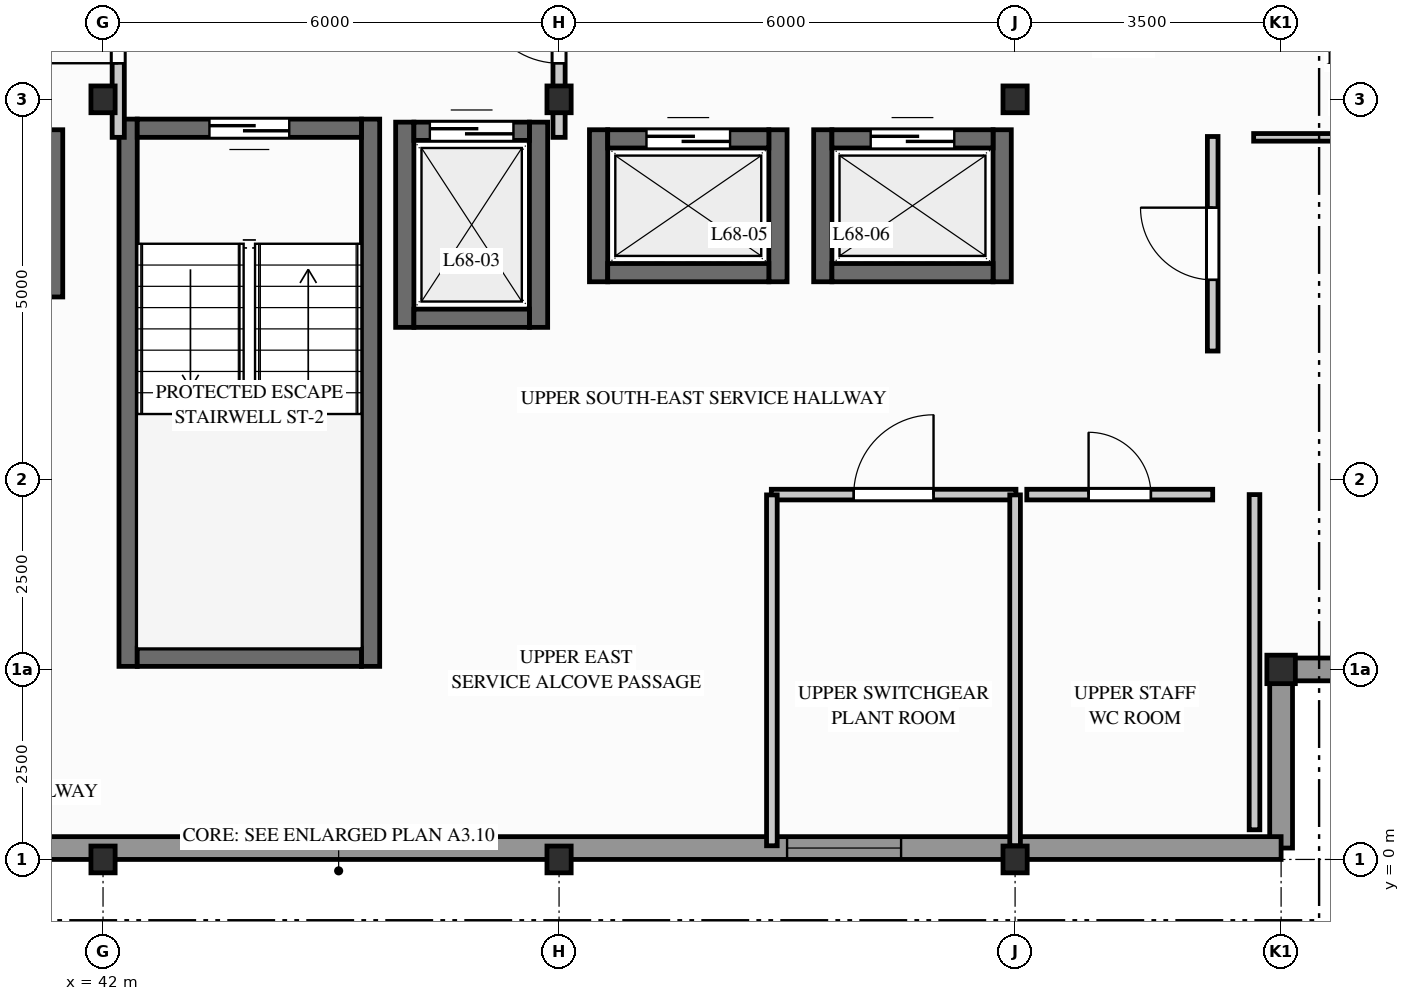
"""IFC4 building model, lengths in metres.
Left out: names, types, materials, properties, quantities, classifications, styles, units other than length and angle.
Written with IfcOpenShell. Run it as: python <this file> out.ifc"""

import sys

from ifc_helpers import new_model, si_unit, direction, frame, frame_2d, origin, origin_2d, place, context, subcontext, project, spatial, rectangle, i_section, extrude, element, fill, save


model = new_model("IFC4")
c1 = context("Model", 3, precision=1e-05, world=origin(), true_north=direction((0.0, 1.0)))
c2 = subcontext(c1, "Body", "Model", "MODEL_VIEW")
j1 = project(units=[si_unit("LENGTHUNIT", "METRE"), si_unit("PLANEANGLEUNIT", "RADIAN")], contexts=[c1])
p1 = place(None, origin())
s1 = spatial("IfcSite", under=j1, at=p1, CompositionType="ELEMENT")
p2 = place(p1, origin())
s2 = spatial("IfcBuilding", under=s1, at=p2, CompositionType="ELEMENT")
p3 = place(p2, frame((0.0, 0.0, 224.2)))
s3 = spatial("IfcBuildingStorey", under=s2, at=p3, CompositionType="ELEMENT", Elevation=224.2)
for number, where, z_axis, x_axis in (
    (1, (42.0, 0.0, 0.0), (0.0, 0.0, 1.0), (1.0, 0.0, 0.0)),
    (2, (42.0, 10.0, 0.0), (0.0, 0.0, 1.0), (1.0, 0.0, 0.0)),
    (3, (48.0, 0.0, 0.0), (0.0, 0.0, 1.0), (1.0, 0.0, 0.0)),
    (4, (48.0, 10.0, 0.0), (0.0, 0.0, 1.0), (1.0, 0.0, 0.0)),
    (5, (54.0, 0.0, 0.0), (0.0, 0.0, 1.0), (1.0, 0.0, 0.0)),
    (6, (54.0, 10.0, 0.0), (0.0, 0.0, 1.0), (1.0, 0.0, 0.0)),
):
    element("IfcColumn", number, at=place(p3, frame(where, z_axis=z_axis, x_axis=x_axis)), inside=s3, PredefinedType="COLUMN", context=c2, shape_type="SweptSolid", body=[
        extrude(i_section(OverallWidth=0.318, OverallDepth=0.353, WebThickness=0.023, FlangeThickness=0.038, FilletRadius=0.015, at=origin_2d()), origin(), (0.0, 0.0, 1.0), 3.1),
    ])
p4 = place(p3, frame((57.5, 2.5, 0.0), z_axis=(0.0, 0.0, 1.0), x_axis=(1.0, 0.0, 0.0)))
e7 = element("IfcColumn", 7, at=p4, inside=s3, PredefinedType="COLUMN", context=c2, shape_type="SweptSolid", body=[
    extrude(i_section(OverallWidth=0.375, OverallDepth=0.375, WebThickness=0.017, FlangeThickness=0.027, FilletRadius=0.015, at=origin_2d()), origin(), (0.0, 0.0, 1.0), 3.1),
])
for number, where, z_axis, x_axis in (
    (8, (57.5, 0.15, 0.0), (0.0, 0.0, 1.0), (0.0, 1.0, 0.0)),
    (9, (57.5, 2.5, 0.0), (0.0, 0.0, 1.0), (1.0, 0.0, 0.0)),
):
    element("IfcWall", number, at=place(p3, frame(where, z_axis=z_axis, x_axis=x_axis)), inside=s3, PredefinedType="STANDARD", context=c2, shape_type="SweptSolid", body=[
        extrude(rectangle(XDim=2.35, YDim=0.3, at=frame_2d((1.175, 0.0))), origin(), (0.0, 0.0, 1.0), 2.89),
    ])
p5 = place(p3, frame((29.75, 0.15, 0.0), z_axis=(0.0, 0.0, 1.0), x_axis=(1.0, 0.0, 0.0)))
e10 = element("IfcWall", 10, at=p5, inside=s3, PredefinedType="STANDARD", context=c2, shape_type="SweptSolid", body=[
    extrude(rectangle(XDim=27.75, YDim=0.3, at=frame_2d((13.875, 0.0))), origin(), (0.0, 0.0, 1.0), 2.332),
])
p6 = place(p5, frame((2.5, 0.0, 0.712)))
e11 = element("IfcOpeningElement", 11, at=p6, cuts=e10, PredefinedType="OPENING", context=c2, shape_type="SweptSolid", body=[
    extrude(rectangle(XDim=0.8, YDim=1.4, at=frame_2d((0.4, 0.7))), frame((0.0, 0.16, 0.0), z_axis=(0.0, -1.0, 0.0), x_axis=(1.0, 0.0, 0.0)), (0.0, 0.0, 1.0), 0.32),
])
p7 = place(p5, frame((21.25, 0.0, 0.312)))
e12 = element("IfcOpeningElement", 12, at=p7, cuts=e10, PredefinedType="OPENING", context=c2, shape_type="SweptSolid", body=[
    extrude(rectangle(XDim=1.5, YDim=1.8, at=frame_2d((0.75, 0.9))), frame((0.0, 0.16, 0.0), z_axis=(0.0, -1.0, 0.0), x_axis=(1.0, 0.0, 0.0)), (0.0, 0.0, 1.0), 0.32),
])
for number, where, z_axis, x_axis in (
    (13, (42.33, 2.54, 0.0), (0.0, 0.0, 1.0), (0.0, 1.0, 0.0)),
    (14, (45.52, 2.54, 0.0), (0.0, 0.0, 1.0), (0.0, 1.0, 0.0)),
):
    element("IfcWall", number, at=place(p3, frame(where, z_axis=z_axis, x_axis=x_axis)), inside=s3, PredefinedType="SHEAR", context=c2, shape_type="SweptSolid", body=[
        extrude(rectangle(XDim=7.2, YDim=0.24, at=frame_2d((3.6, 0.0))), origin(), (0.0, 0.0, 1.0), 2.89),
    ])
p8 = place(p3, frame((42.45, 2.66, 0.0), z_axis=(0.0, 0.0, 1.0), x_axis=(1.0, 0.0, 0.0)))
e15 = element("IfcWall", 15, at=p8, inside=s3, PredefinedType="SHEAR", context=c2, shape_type="SweptSolid", body=[
    extrude(rectangle(XDim=2.95, YDim=0.24, at=frame_2d((1.475, 0.0))), origin(), (0.0, 0.0, 1.0), 2.89),
])
p9 = place(p3, frame((45.4, 9.62, 0.0), z_axis=(0.0, 0.0, 1.0), x_axis=(-1.0, 0.0, 0.0)))
e16 = element("IfcWall", 16, at=p9, inside=s3, PredefinedType="SHEAR", context=c2, shape_type="SweptSolid", body=[
    extrude(rectangle(XDim=2.95, YDim=0.24, at=frame_2d((1.475, 0.0))), origin(), (0.0, 0.0, 1.0), 2.89),
])
p10 = place(p9, frame((0.95, 0.0, 0.0)))
e17 = element("IfcOpeningElement", 17, at=p10, cuts=e16, PredefinedType="OPENING", context=c2, shape_type="SweptSolid", body=[
    extrude(rectangle(XDim=1.05, YDim=2.06, at=frame_2d((0.525, 1.03))), frame((0.0, 0.13, 0.0), z_axis=(0.0, -1.0, 0.0), x_axis=(1.0, 0.0, 0.0)), (0.0, 0.0, 1.0), 0.26),
])
for number, where, z_axis, x_axis in (
    (18, (45.97, 7.0, 0.0), (0.0, 0.0, 1.0), (0.0, 1.0, 0.0)),
    (19, (47.73, 7.0, 0.0), (0.0, 0.0, 1.0), (0.0, 1.0, 0.0)),
):
    element("IfcWall", number, at=place(p3, frame(where, z_axis=z_axis, x_axis=x_axis)), inside=s3, PredefinedType="SHEAR", context=c2, shape_type="SweptSolid", body=[
        extrude(rectangle(XDim=2.7, YDim=0.24, at=frame_2d((1.35, 0.0))), origin(), (0.0, 0.0, 1.0), 2.89),
    ])
p11 = place(p3, frame((46.09, 7.12, 0.0), z_axis=(0.0, 0.0, 1.0), x_axis=(1.0, 0.0, 0.0)))
e20 = element("IfcWall", 20, at=p11, inside=s3, PredefinedType="SHEAR", context=c2, shape_type="SweptSolid", body=[
    extrude(rectangle(XDim=1.52, YDim=0.24, at=frame_2d((0.76, 0.0))), origin(), (0.0, 0.0, 1.0), 2.89),
])
p12 = place(p3, frame((46.09, 9.58, 0.0), z_axis=(0.0, 0.0, 1.0), x_axis=(1.0, 0.0, 0.0)))
e21 = element("IfcWall", 21, at=p12, inside=s3, PredefinedType="SHEAR", context=c2, shape_type="SweptSolid", body=[
    extrude(rectangle(XDim=1.52, YDim=0.24, at=frame_2d((0.76, 0.0))), origin(), (0.0, 0.0, 1.0), 2.89),
])
p13 = place(p12, frame((0.21, 0.0, 0.0)))
e22 = element("IfcOpeningElement", 22, at=p13, cuts=e21, PredefinedType="OPENING", context=c2, shape_type="SweptSolid", body=[
    extrude(rectangle(XDim=1.1, YDim=2.06, at=frame_2d((0.55, 1.03))), frame((0.0, 0.13, 0.0), z_axis=(0.0, -1.0, 0.0), x_axis=(1.0, 0.0, 0.0)), (0.0, 0.0, 1.0), 0.26),
])
p14 = place(p3, frame((41.35, 7.4, 0.0), z_axis=(0.0, 0.0, 1.0), x_axis=(0.0, 1.0, 0.0)))
e23 = element("IfcWall", 23, at=p14, inside=s3, PredefinedType="SHEAR", context=c2, shape_type="SweptSolid", body=[
    extrude(rectangle(XDim=2.2, YDim=0.24, at=frame_2d((1.1, 0.0))), origin(), (0.0, 0.0, 1.0), 2.89),
])
for number, where, z_axis, x_axis in (
    (24, (48.52, 7.6, 0.0), (0.0, 0.0, 1.0), (0.0, 1.0, 0.0)),
    (25, (50.88, 7.6, 0.0), (0.0, 0.0, 1.0), (0.0, 1.0, 0.0)),
):
    element("IfcWall", number, at=place(p3, frame(where, z_axis=z_axis, x_axis=x_axis)), inside=s3, PredefinedType="SHEAR", context=c2, shape_type="SweptSolid", body=[
        extrude(rectangle(XDim=2.0, YDim=0.24, at=frame_2d((1.0, 0.0))), origin(), (0.0, 0.0, 1.0), 2.89),
    ])
p15 = place(p3, frame((48.64, 7.72, 0.0), z_axis=(0.0, 0.0, 1.0), x_axis=(1.0, 0.0, 0.0)))
e26 = element("IfcWall", 26, at=p15, inside=s3, PredefinedType="SHEAR", context=c2, shape_type="SweptSolid", body=[
    extrude(rectangle(XDim=2.12, YDim=0.24, at=frame_2d((1.06, 0.0))), origin(), (0.0, 0.0, 1.0), 2.89),
])
p16 = place(p3, frame((48.64, 9.48, 0.0), z_axis=(0.0, 0.0, 1.0), x_axis=(1.0, 0.0, 0.0)))
e27 = element("IfcWall", 27, at=p16, inside=s3, PredefinedType="SHEAR", context=c2, shape_type="SweptSolid", body=[
    extrude(rectangle(XDim=2.12, YDim=0.24, at=frame_2d((1.06, 0.0))), origin(), (0.0, 0.0, 1.0), 2.89),
])
p17 = place(p16, frame((0.51, 0.0, 0.0)))
e28 = element("IfcOpeningElement", 28, at=p17, cuts=e27, PredefinedType="OPENING", context=c2, shape_type="SweptSolid", body=[
    extrude(rectangle(XDim=1.1, YDim=2.06, at=frame_2d((0.55, 1.03))), frame((0.0, 0.13, 0.0), z_axis=(0.0, -1.0, 0.0), x_axis=(1.0, 0.0, 0.0)), (0.0, 0.0, 1.0), 0.26),
])
for number, where, z_axis, x_axis in (
    (29, (51.47, 7.6, 0.0), (0.0, 0.0, 1.0), (0.0, 1.0, 0.0)),
    (30, (53.83, 7.6, 0.0), (0.0, 0.0, 1.0), (0.0, 1.0, 0.0)),
):
    element("IfcWall", number, at=place(p3, frame(where, z_axis=z_axis, x_axis=x_axis)), inside=s3, PredefinedType="SHEAR", context=c2, shape_type="SweptSolid", body=[
        extrude(rectangle(XDim=2.0, YDim=0.24, at=frame_2d((1.0, 0.0))), origin(), (0.0, 0.0, 1.0), 2.89),
    ])
p18 = place(p3, frame((51.59, 7.72, 0.0), z_axis=(0.0, 0.0, 1.0), x_axis=(1.0, 0.0, 0.0)))
e31 = element("IfcWall", 31, at=p18, inside=s3, PredefinedType="SHEAR", context=c2, shape_type="SweptSolid", body=[
    extrude(rectangle(XDim=2.12, YDim=0.24, at=frame_2d((1.06, 0.0))), origin(), (0.0, 0.0, 1.0), 2.89),
])
p19 = place(p3, frame((51.59, 9.48, 0.0), z_axis=(0.0, 0.0, 1.0), x_axis=(1.0, 0.0, 0.0)))
e32 = element("IfcWall", 32, at=p19, inside=s3, PredefinedType="SHEAR", context=c2, shape_type="SweptSolid", body=[
    extrude(rectangle(XDim=2.12, YDim=0.24, at=frame_2d((1.06, 0.0))), origin(), (0.0, 0.0, 1.0), 2.89),
])
p20 = place(p19, frame((0.51, 0.0, 0.0)))
e33 = element("IfcOpeningElement", 33, at=p20, cuts=e32, PredefinedType="OPENING", context=c2, shape_type="SweptSolid", body=[
    extrude(rectangle(XDim=1.1, YDim=2.06, at=frame_2d((0.55, 1.03))), frame((0.0, 0.13, 0.0), z_axis=(0.0, -1.0, 0.0), x_axis=(1.0, 0.0, 0.0)), (0.0, 0.0, 1.0), 0.26),
])
p21 = place(p3, frame((50.793, 4.8, 0.0), z_axis=(0.0, 0.0, 1.0), x_axis=(1.0, 0.0, 0.0)))
e34 = element("IfcWall", 34, at=p21, inside=s3, PredefinedType="PARTITIONING", context=c2, shape_type="SweptSolid", body=[
    extrude(rectangle(XDim=3.219, YDim=0.14, at=frame_2d((1.609, 0.0))), origin(), (0.0, 0.0, 1.0), 2.325),
])
p22 = place(p21, frame((1.084, 0.0, 0.0)))
e35 = element("IfcOpeningElement", 35, at=p22, cuts=e34, PredefinedType="OPENING", context=c2, shape_type="SweptSolid", body=[
    extrude(rectangle(XDim=1.05, YDim=2.06, at=frame_2d((0.525, 1.03))), frame((0.0, 0.08, 0.0), z_axis=(0.0, -1.0, 0.0), x_axis=(1.0, 0.0, 0.0)), (0.0, 0.0, 1.0), 0.16),
])
p23 = place(p3, frame((54.154, 4.8, 0.0), z_axis=(0.0, 0.0, 1.0), x_axis=(1.0, 0.0, 0.0)))
e36 = element("IfcWall", 36, at=p23, inside=s3, PredefinedType="PARTITIONING", context=c2, shape_type="SweptSolid", body=[
    extrude(rectangle(XDim=2.446, YDim=0.14, at=frame_2d((1.223, 0.0))), origin(), (0.0, 0.0, 1.0), 2.89),
])
p24 = place(p23, frame((0.813, 0.0, 0.0)))
e37 = element("IfcOpeningElement", 37, at=p24, cuts=e36, PredefinedType="OPENING", context=c2, shape_type="SweptSolid", body=[
    extrude(rectangle(XDim=0.82, YDim=2.02, at=frame_2d((0.41, 1.01))), frame((0.0, 0.08, 0.0), z_axis=(0.0, -1.0, 0.0), x_axis=(1.0, 0.0, 0.0)), (0.0, 0.0, 1.0), 0.16),
])
p25 = place(p3, frame((56.6, 6.689, 0.0), z_axis=(0.0, 0.0, 1.0), x_axis=(0.0, 1.0, 0.0)))
e38 = element("IfcWall", 38, at=p25, inside=s3, PredefinedType="PARTITIONING", context=c2, shape_type="SweptSolid", body=[
    extrude(rectangle(XDim=2.823, YDim=0.14, at=frame_2d((1.411, 0.0))), origin(), (0.0, 0.0, 1.0), 2.89),
])
p26 = place(p25, frame((0.936, 0.0, 0.0)))
e39 = element("IfcOpeningElement", 39, at=p26, cuts=e38, PredefinedType="OPENING", context=c2, shape_type="SweptSolid", body=[
    extrude(rectangle(XDim=0.95, YDim=2.05, at=frame_2d((0.475, 1.025))), frame((0.0, 0.08, 0.0), z_axis=(0.0, -1.0, 0.0), x_axis=(1.0, 0.0, 0.0)), (0.0, 0.0, 1.0), 0.16),
])
p27 = place(p3, frame((50.8, 0.18, 0.0), z_axis=(0.0, 0.0, 1.0), x_axis=(0.0, 1.0, 0.0)))
e40 = element("IfcWall", 40, at=p27, inside=s3, PredefinedType="PARTITIONING", context=c2, shape_type="SweptSolid", body=[
    extrude(rectangle(XDim=4.616, YDim=0.14, at=frame_2d((2.308, 0.0))), origin(), (0.0, 0.0, 1.0), 2.89),
])
p28 = place(p3, frame((54.0, 0.18, 0.0), z_axis=(0.0, 0.0, 1.0), x_axis=(0.0, 1.0, 0.0)))
e41 = element("IfcWall", 41, at=p28, inside=s3, PredefinedType="PARTITIONING", context=c2, shape_type="SweptSolid", body=[
    extrude(rectangle(XDim=4.616, YDim=0.14, at=frame_2d((2.308, 0.0))), origin(), (0.0, 0.0, 1.0), 2.325),
])
p29 = place(p3, frame((42.2, 9.5, 0.0), z_axis=(0.0, 0.0, 1.0), x_axis=(0.0, 1.0, 0.0)))
e42 = element("IfcWall", 42, at=p29, inside=s3, PredefinedType="PARTITIONING", context=c2, shape_type="SweptSolid", body=[
    extrude(rectangle(XDim=3.0, YDim=0.16, at=frame_2d((1.5, 0.0))), origin(), (0.0, 0.0, 1.0), 2.325),
])
p30 = place(p29, frame((0.975, 0.0, 0.0)))
e43 = element("IfcOpeningElement", 43, at=p30, cuts=e42, PredefinedType="OPENING", context=c2, shape_type="SweptSolid", body=[
    extrude(rectangle(XDim=1.05, YDim=2.06, at=frame_2d((0.525, 1.03))), frame((0.0, 0.09, 0.0), z_axis=(0.0, -1.0, 0.0), x_axis=(1.0, 0.0, 0.0)), (0.0, 0.0, 1.0), 0.18),
])
p31 = place(p3, frame((48.0, 9.5, 0.0), z_axis=(0.0, 0.0, 1.0), x_axis=(0.0, 1.0, 0.0)))
e44 = element("IfcWall", 44, at=p31, inside=s3, PredefinedType="PARTITIONING", context=c2, shape_type="SweptSolid", body=[
    extrude(rectangle(XDim=3.0, YDim=0.16, at=frame_2d((1.5, 0.0))), origin(), (0.0, 0.0, 1.0), 2.325),
])
p32 = place(p31, frame((0.975, 0.0, 0.0)))
e45 = element("IfcOpeningElement", 45, at=p32, cuts=e44, PredefinedType="OPENING", context=c2, shape_type="SweptSolid", body=[
    extrude(rectangle(XDim=1.05, YDim=2.06, at=frame_2d((0.525, 1.03))), frame((0.0, 0.09, 0.0), z_axis=(0.0, -1.0, 0.0), x_axis=(1.0, 0.0, 0.0)), (0.0, 0.0, 1.0), 0.18),
])
p33 = place(p3, frame((57.139, 9.5, 0.0), z_axis=(0.0, 0.0, 1.0), x_axis=(1.0, 0.0, 0.0)))
e46 = element("IfcWall", 46, at=p33, inside=s3, PredefinedType="PARTITIONING", context=c2, shape_type="SweptSolid", body=[
    extrude(rectangle(XDim=2.661, YDim=0.1, at=frame_2d((1.331, 0.0))), origin(), (0.0, 0.0, 1.0), 2.89),
])
p34 = place(p3, frame((57.15, 0.39, 0.0), z_axis=(0.0, 0.0, 1.0), x_axis=(0.0, 1.0, 0.0)))
e47 = element("IfcWall", 47, at=p34, inside=s3, PredefinedType="PARTITIONING", context=c2, shape_type="SweptSolid", body=[
    extrude(rectangle(XDim=4.41, YDim=0.14, at=frame_2d((2.205, 0.0))), origin(), (0.0, 0.0, 1.0), 2.89),
])
p35 = place(p7, origin())
e48 = element("IfcWindow", 48, at=p35, inside=s3, PartitioningType="SINGLE_PANEL", PredefinedType="WINDOW", context=c2, shape_type="SweptSolid", body=[
    extrude(rectangle(XDim=1.5, YDim=1.8, at=frame_2d((0.75, 0.9))), frame((0.0, 0.03, 0.0), z_axis=(0.0, -1.0, 0.0), x_axis=(1.0, 0.0, 0.0)), (0.0, 0.0, 1.0), 0.06),
])
fill(e12, e48)
p36 = place(p10, origin())
e49 = element("IfcDoor", 49, at=p36, inside=s3, OperationType="SINGLE_SWING_LEFT", PredefinedType="DOOR", context=c2, shape_type="SweptSolid", body=[
    extrude(rectangle(XDim=1.05, YDim=2.06, at=frame_2d((0.525, 1.03))), frame((0.0, 0.025, 0.0), z_axis=(0.0, -1.0, 0.0), x_axis=(1.0, 0.0, 0.0)), (0.0, 0.0, 1.0), 0.05),
])
fill(e17, e49)
p37 = place(p13, origin())
e50 = element("IfcDoor", 50, at=p37, inside=s3, OperationType="SLIDING_TO_LEFT", PredefinedType="DOOR", context=c2, shape_type="SweptSolid", body=[
    extrude(rectangle(XDim=1.1, YDim=2.06, at=frame_2d((0.55, 1.03))), frame((0.0, 0.025, 0.0), z_axis=(0.0, -1.0, 0.0), x_axis=(1.0, 0.0, 0.0)), (0.0, 0.0, 1.0), 0.05),
])
fill(e22, e50)
p38 = place(p17, origin())
e51 = element("IfcDoor", 51, at=p38, inside=s3, OperationType="SLIDING_TO_LEFT", PredefinedType="DOOR", context=c2, shape_type="SweptSolid", body=[
    extrude(rectangle(XDim=1.1, YDim=2.06, at=frame_2d((0.55, 1.03))), frame((0.0, 0.025, 0.0), z_axis=(0.0, -1.0, 0.0), x_axis=(1.0, 0.0, 0.0)), (0.0, 0.0, 1.0), 0.05),
])
fill(e28, e51)
p39 = place(p20, origin())
e52 = element("IfcDoor", 52, at=p39, inside=s3, OperationType="SLIDING_TO_RIGHT", PredefinedType="DOOR", context=c2, shape_type="SweptSolid", body=[
    extrude(rectangle(XDim=1.1, YDim=2.06, at=frame_2d((0.55, 1.03))), frame((0.0, 0.025, 0.0), z_axis=(0.0, -1.0, 0.0), x_axis=(1.0, 0.0, 0.0)), (0.0, 0.0, 1.0), 0.05),
])
fill(e33, e52)
p40 = place(p22, origin())
e53 = element("IfcDoor", 53, at=p40, inside=s3, OperationType="SINGLE_SWING_RIGHT", PredefinedType="DOOR", context=c2, shape_type="SweptSolid", body=[
    extrude(rectangle(XDim=1.05, YDim=2.06, at=frame_2d((0.525, 1.03))), frame((0.0, 0.025, 0.0), z_axis=(0.0, -1.0, 0.0), x_axis=(1.0, 0.0, 0.0)), (0.0, 0.0, 1.0), 0.05),
])
fill(e35, e53)
p41 = place(p24, origin())
e54 = element("IfcDoor", 54, at=p41, inside=s3, OperationType="SINGLE_SWING_LEFT", PredefinedType="DOOR", context=c2, shape_type="SweptSolid", body=[
    extrude(rectangle(XDim=0.82, YDim=2.02, at=frame_2d((0.41, 1.01))), frame((0.0, 0.025, 0.0), z_axis=(0.0, -1.0, 0.0), x_axis=(1.0, 0.0, 0.0)), (0.0, 0.0, 1.0), 0.05),
])
fill(e37, e54)
p42 = place(p26, origin())
e55 = element("IfcDoor", 55, at=p42, inside=s3, OperationType="SINGLE_SWING_RIGHT", PredefinedType="DOOR", context=c2, shape_type="SweptSolid", body=[
    extrude(rectangle(XDim=0.95, YDim=2.05, at=frame_2d((0.475, 1.025))), frame((0.0, 0.025, 0.0), z_axis=(0.0, -1.0, 0.0), x_axis=(1.0, 0.0, 0.0)), (0.0, 0.0, 1.0), 0.05),
])
fill(e39, e55)
p43 = place(p30, origin())
e56 = element("IfcDoor", 56, at=p43, inside=s3, OperationType="SINGLE_SWING_LEFT", PredefinedType="DOOR", context=c2, shape_type="SweptSolid", body=[
    extrude(rectangle(XDim=1.05, YDim=2.06, at=frame_2d((0.525, 1.03))), frame((0.0, 0.025, 0.0), z_axis=(0.0, -1.0, 0.0), x_axis=(1.0, 0.0, 0.0)), (0.0, 0.0, 1.0), 0.05),
])
fill(e43, e56)
p44 = place(p32, origin())
e57 = element("IfcDoor", 57, at=p44, inside=s3, OperationType="SINGLE_SWING_RIGHT", PredefinedType="DOOR", context=c2, shape_type="SweptSolid", body=[
    extrude(rectangle(XDim=1.05, YDim=2.06, at=frame_2d((0.525, 1.03))), frame((0.0, 0.025, 0.0), z_axis=(0.0, -1.0, 0.0), x_axis=(1.0, 0.0, 0.0)), (0.0, 0.0, 1.0), 0.05),
])
fill(e45, e57)
save(model, sys.argv[1])
